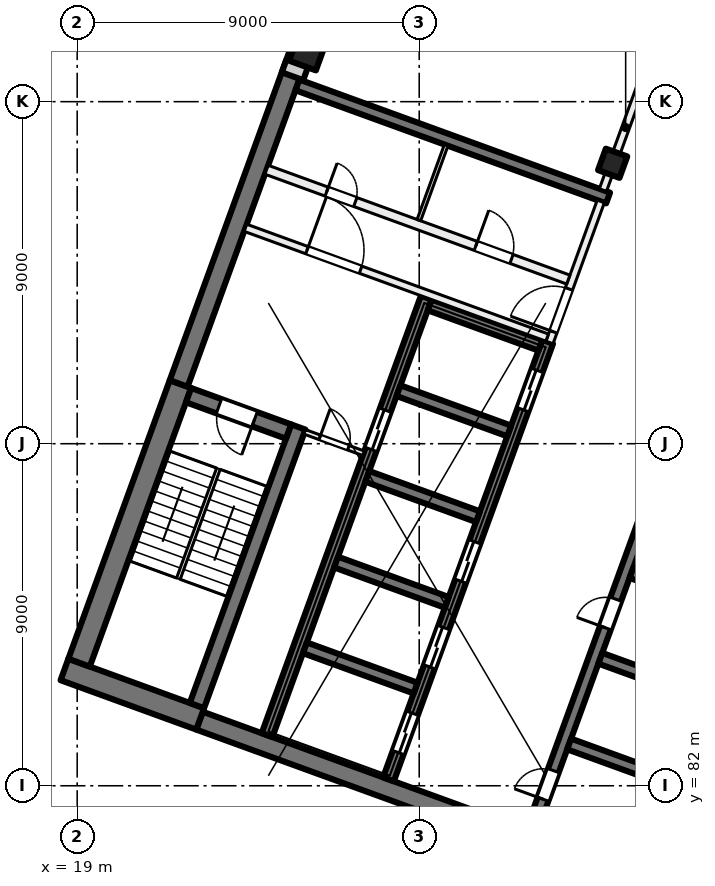
"""IFC4 building model, lengths in metres.
Left out: names, types, materials, properties, quantities, classifications, styles, units other than length and angle.
Written with IfcOpenShell. Run it as: python <this file> out.ifc"""

import sys

from ifc_helpers import new_model, si_unit, direction, frame, frame_2d, origin, origin_2d, place, context, subcontext, project, spatial, rectangle, extrude, element, fill, save


model = new_model("IFC4")
c1 = context("Model", 3, precision=1e-05, world=origin(), true_north=direction((0.0, 1.0)))
c2 = subcontext(c1, "Body", "Model", "MODEL_VIEW")
j1 = project(units=[si_unit("LENGTHUNIT", "METRE"), si_unit("PLANEANGLEUNIT", "RADIAN")], contexts=[c1])
p1 = place(None, origin())
s1 = spatial("IfcSite", under=j1, at=p1, CompositionType="ELEMENT")
p2 = place(p1, origin())
s2 = spatial("IfcBuilding", under=s1, at=p2, CompositionType="ELEMENT")
p3 = place(p2, frame((0.0, 0.0, 188.0)))
s3 = spatial("IfcBuildingStorey", under=s2, at=p3, CompositionType="ELEMENT", Elevation=188.0)
p4 = place(p3, frame((33.091, 98.379, 0.0), z_axis=(0.0, 0.0, 1.0), x_axis=(-0.342020143326, -0.939692620786, 0.0)))
e1 = element("IfcColumn", 1, at=p4, inside=s3, PredefinedType="COLUMN", context=c2, shape_type="SweptSolid", body=[
    extrude(rectangle(XDim=0.6, YDim=0.6, at=origin_2d()), origin(), (0.0, 0.0, 1.0), 4.0),
])
p5 = place(p3, frame((25.056, 101.303, 0.0), z_axis=(0.0, 0.0, 1.0), x_axis=(-0.342020143326, -0.939692620786, 0.0)))
e2 = element("IfcColumn", 2, at=p5, inside=s3, PredefinedType="COLUMN", context=c2, shape_type="SweptSolid", body=[
    extrude(rectangle(XDim=0.75, YDim=0.75, at=origin_2d()), origin(), (0.0, 0.0, 1.0), 4.0),
])
p6 = place(p3, frame((35.75, 78.788, 0.0), z_axis=(0.0, 0.0, 1.0), x_axis=(-0.939692894512, 0.342019391267, 0.0)))
e3 = element("IfcWall", 3, at=p6, inside=s3, PredefinedType="SHEAR", context=c2, shape_type="SweptSolid", body=[
    extrude(rectangle(XDim=14.4, YDim=0.5, at=frame_2d((7.2, 0.0))), origin(), (0.0, 0.0, 1.0), 4.0),
])
p7 = place(p3, frame((22.236, 83.76, 0.0), z_axis=(0.0, 0.0, 1.0), x_axis=(-0.939680822529, 0.342052557032, 0.0)))
e4 = element("IfcWall", 4, at=p7, inside=s3, PredefinedType="SHEAR", context=c2, shape_type="SweptSolid", body=[
    extrude(rectangle(XDim=3.8, YDim=0.6, at=frame_2d((1.9, 0.0))), origin(), (0.0, 0.0, 1.0), 4.0),
])
p8 = place(p3, frame((19.05, 85.239, 0.0), z_axis=(0.0, 0.0, 1.0), x_axis=(0.342016982193, 0.939693771338, 0.0)))
e5 = element("IfcWall", 5, at=p8, inside=s3, PredefinedType="SHEAR", context=c2, shape_type="SweptSolid", body=[
    extrude(rectangle(XDim=7.8, YDim=0.6, at=frame_2d((3.9, 0.0))), origin(), (0.0, 0.0, 1.0), 4.0),
])
p9 = place(p3, frame((21.67, 92.585, 0.0), z_axis=(0.0, 0.0, 1.0), x_axis=(0.342035714298, 0.93968695327, 0.0)))
e6 = element("IfcWall", 6, at=p9, inside=s3, PredefinedType="SHEAR", context=c2, shape_type="SweptSolid", body=[
    extrude(rectangle(XDim=8.975, YDim=0.5, at=frame_2d((4.488, 0.0))), origin(), (0.0, 0.0, 1.0), 4.0),
])
p10 = place(p3, frame((22.15, 84.11, 0.0), z_axis=(0.0, 0.0, 1.0), x_axis=(0.342016982193, 0.939693771338, 0.0)))
e7 = element("IfcWall", 7, at=p10, inside=s3, PredefinedType="SHEAR", context=c2, shape_type="SweptSolid", body=[
    extrude(rectangle(XDim=7.8, YDim=0.4, at=frame_2d((3.9, 0.0))), origin(), (0.0, 0.0, 1.0), 4.0),
])
p11 = place(p3, frame((24.562, 91.32, 0.0), z_axis=(0.0, 0.0, 1.0), x_axis=(-0.939717030584, 0.341953070509, 0.0)))
e8 = element("IfcWall", 8, at=p11, inside=s3, PredefinedType="SHEAR", context=c2, shape_type="SweptSolid", body=[
    extrude(rectangle(XDim=2.8, YDim=0.4, at=frame_2d((1.4, 0.0))), origin(), (0.0, 0.0, 1.0), 4.0),
])
p12 = place(p11, frame((0.95, 0.0, 0.0)))
e9 = element("IfcOpeningElement", 9, at=p12, cuts=e8, PredefinedType="OPENING", context=c2, shape_type="SweptSolid", body=[
    extrude(rectangle(XDim=1.0, YDim=2.1, at=frame_2d((0.5, 1.05))), frame((0.0, 0.21, 0.0), z_axis=(0.0, -1.0, 0.0), x_axis=(1.0, 0.0, 0.0)), (0.0, 0.0, 1.0), 0.42),
])
p13 = place(p3, frame((30.949, 80.801, 0.0), z_axis=(0.0, 0.0, 1.0), x_axis=(0.342016684409, 0.939693879721, 0.0)))
e10 = element("IfcWall", 10, at=p13, inside=s3, PredefinedType="SHEAR", context=c2, shape_type="SweptSolid", body=[
    extrude(rectangle(XDim=12.25, YDim=0.3, at=frame_2d((6.125, 0.0))), origin(), (0.0, 0.0, 1.0), 4.0),
])
p14 = place(p13, frame((0.9, 0.0, 0.0)))
e11 = element("IfcOpeningElement", 11, at=p14, cuts=e10, PredefinedType="OPENING", context=c2, shape_type="SweptSolid", body=[
    extrude(rectangle(XDim=0.8, YDim=2.1, at=frame_2d((0.4, 1.05))), frame((0.0, 0.16, 0.0), z_axis=(0.0, -1.0, 0.0), x_axis=(1.0, 0.0, 0.0)), (0.0, 0.0, 1.0), 0.32),
])
p15 = place(p13, frame((5.7, 0.0, 0.0)))
e12 = element("IfcOpeningElement", 12, at=p15, cuts=e10, PredefinedType="OPENING", context=c2, shape_type="SweptSolid", body=[
    extrude(rectangle(XDim=0.8, YDim=2.1, at=frame_2d((0.4, 1.05))), frame((0.0, 0.16, 0.0), z_axis=(0.0, -1.0, 0.0), x_axis=(1.0, 0.0, 0.0)), (0.0, 0.0, 1.0), 0.32),
])
p16 = place(p3, frame((34.858, 82.039, 0.0), z_axis=(0.0, 0.0, 1.0), x_axis=(-0.939689908313, 0.342027595692, 0.0)))
e13 = element("IfcWall", 13, at=p16, inside=s3, PredefinedType="SHEAR", context=c2, shape_type="SweptSolid", body=[
    extrude(rectangle(XDim=3.1, YDim=0.3, at=frame_2d((1.55, 0.0))), origin(), (0.0, 0.0, 1.0), 4.0),
])
p17 = place(p3, frame((35.679, 84.294, 0.0), z_axis=(0.0, 0.0, 1.0), x_axis=(-0.939706007505, 0.341983361377, 0.0)))
e14 = element("IfcWall", 14, at=p17, inside=s3, PredefinedType="SHEAR", context=c2, shape_type="SweptSolid", body=[
    extrude(rectangle(XDim=3.1, YDim=0.3, at=frame_2d((1.55, 0.0))), origin(), (0.0, 0.0, 1.0), 4.0),
])
p18 = place(p3, frame((36.5, 86.549, 0.0), z_axis=(0.0, 0.0, 1.0), x_axis=(-0.939689908313, 0.342027595692, 0.0)))
e15 = element("IfcWall", 15, at=p18, inside=s3, PredefinedType="SHEAR", context=c2, shape_type="SweptSolid", body=[
    extrude(rectangle(XDim=3.1, YDim=0.3, at=frame_2d((1.55, 0.0))), origin(), (0.0, 0.0, 1.0), 4.0),
])
p19 = place(p3, frame((27.191, 82.169, 0.0), z_axis=(0.0, 0.0, 1.0), x_axis=(0.342016684409, 0.939693879721, 0.0)))
e16 = element("IfcWall", 16, at=p19, inside=s3, PredefinedType="SHEAR", context=c2, shape_type="SweptSolid", body=[
    extrude(rectangle(XDim=12.25, YDim=0.3, at=frame_2d((6.125, 0.0))), origin(), (0.0, 0.0, 1.0), 4.0),
])
p20 = place(p19, frame((0.75, 0.0, 0.0)))
e17 = element("IfcOpeningElement", 17, at=p20, cuts=e16, PredefinedType="OPENING", context=c2, shape_type="SweptSolid", body=[
    extrude(rectangle(XDim=1.1, YDim=2.1, at=frame_2d((0.55, 1.05))), frame((0.0, 0.16, 0.0), z_axis=(0.0, -1.0, 0.0), x_axis=(1.0, 0.0, 0.0)), (0.0, 0.0, 1.0), 0.32),
])
p21 = place(p19, frame((3.15, 0.0, 0.0)))
e18 = element("IfcOpeningElement", 18, at=p21, cuts=e16, PredefinedType="OPENING", context=c2, shape_type="SweptSolid", body=[
    extrude(rectangle(XDim=1.1, YDim=2.1, at=frame_2d((0.55, 1.05))), frame((0.0, 0.16, 0.0), z_axis=(0.0, -1.0, 0.0), x_axis=(1.0, 0.0, 0.0)), (0.0, 0.0, 1.0), 0.32),
])
p22 = place(p19, frame((5.55, 0.0, 0.0)))
e19 = element("IfcOpeningElement", 19, at=p22, cuts=e16, PredefinedType="OPENING", context=c2, shape_type="SweptSolid", body=[
    extrude(rectangle(XDim=1.1, YDim=2.1, at=frame_2d((0.55, 1.05))), frame((0.0, 0.16, 0.0), z_axis=(0.0, -1.0, 0.0), x_axis=(1.0, 0.0, 0.0)), (0.0, 0.0, 1.0), 0.32),
])
p23 = place(p19, frame((10.35, 0.0, 0.0)))
e20 = element("IfcOpeningElement", 20, at=p23, cuts=e16, PredefinedType="OPENING", context=c2, shape_type="SweptSolid", body=[
    extrude(rectangle(XDim=1.1, YDim=2.1, at=frame_2d((0.55, 1.05))), frame((0.0, 0.16, 0.0), z_axis=(0.0, -1.0, 0.0), x_axis=(1.0, 0.0, 0.0)), (0.0, 0.0, 1.0), 0.32),
])
p24 = place(p3, frame((23.996, 83.332, 0.0), z_axis=(0.0, 0.0, 1.0), x_axis=(0.342016684409, 0.939693879721, 0.0)))
e21 = element("IfcWall", 21, at=p24, inside=s3, PredefinedType="SHEAR", context=c2, shape_type="SweptSolid", body=[
    extrude(rectangle(XDim=12.25, YDim=0.3, at=frame_2d((6.125, 0.0))), origin(), (0.0, 0.0, 1.0), 4.0),
])
p25 = place(p24, frame((8.0, 0.0, 0.0)))
e22 = element("IfcOpeningElement", 22, at=p25, cuts=e21, PredefinedType="OPENING", context=c2, shape_type="SweptSolid", body=[
    extrude(rectangle(XDim=1.1, YDim=2.1, at=frame_2d((0.55, 1.05))), frame((0.0, 0.16, 0.0), z_axis=(0.0, -1.0, 0.0), x_axis=(1.0, 0.0, 0.0)), (0.0, 0.0, 1.0), 0.32),
])
for number, where, z_axis, x_axis in (
    (23, (27.905, 84.57, 0.0), (0.0, 0.0, 1.0), (-0.94, 0.342, 0.0)),
    (24, (28.726, 86.825, 0.0), (0.0, 0.0, 1.0), (-0.94, 0.342, 0.0)),
    (25, (29.546, 89.08, 0.0), (0.0, 0.0, 1.0), (-0.94, 0.342, 0.0)),
):
    element("IfcWall", number, at=place(p3, frame(where, z_axis=z_axis, x_axis=x_axis)), inside=s3, PredefinedType="SHEAR", context=c2, shape_type="SweptSolid", body=[
        extrude(rectangle(XDim=3.1, YDim=0.3, at=frame_2d((1.55, 0.0))), origin(), (0.0, 0.0, 1.0), 4.0),
    ])
for number, where, z_axis, x_axis in (
    (26, (30.367, 91.336, 0.0), (0.0, 0.0, 1.0), (-0.94, 0.342, 0.0)),
    (27, (31.188, 93.591, 0.0), (0.0, 0.0, 1.0), (-0.94, 0.342, 0.0)),
):
    element("IfcWall", number, at=place(p3, frame(where, z_axis=z_axis, x_axis=x_axis)), inside=s3, PredefinedType="SHEAR", context=c2, shape_type="SweptSolid", body=[
        extrude(rectangle(XDim=3.1, YDim=0.3, at=frame_2d((1.55, 0.0))), origin(), (0.0, 0.0, 1.0), 4.0),
    ])
p26 = place(p3, frame((32.971, 97.465, 0.0), z_axis=(0.0, 0.0, 1.0), x_axis=(-0.939695066972, 0.34201342241, 0.0)))
e28 = element("IfcWall", 28, at=p26, inside=s3, PredefinedType="SHEAR", context=c2, shape_type="SweptSolid", body=[
    extrude(rectangle(XDim=8.7, YDim=0.3, at=frame_2d((4.35, 0.0))), origin(), (0.0, 0.0, 1.0), 4.0),
])
p27 = place(p3, frame((24.666, 100.669, 0.0), z_axis=(0.0, 0.0, 1.0), x_axis=(0.34201964167, 0.939692803373, 0.0)))
e29 = element("IfcWall", 29, at=p27, inside=s3, PredefinedType="SOLIDWALL", context=c2, shape_type="SweptSolid", body=[
    extrude(rectangle(XDim=32.884, YDim=0.6, at=frame_2d((16.442, 0.0))), origin(), (0.0, 0.0, 1.0), 3.625),
])
p28 = place(p27, frame((1.48, 0.0, 0.9)))
e30 = element("IfcOpeningElement", 30, at=p28, cuts=e29, PredefinedType="OPENING", context=c2, shape_type="SweptSolid", body=[
    extrude(rectangle(XDim=3.0, YDim=2.4, at=frame_2d((1.5, 1.2))), frame((0.0, 0.31, 0.0), z_axis=(0.0, -1.0, 0.0), x_axis=(1.0, 0.0, 0.0)), (0.0, 0.0, 1.0), 0.62),
])
p29 = place(p27, frame((5.98, 0.0, 0.9)))
e31 = element("IfcOpeningElement", 31, at=p29, cuts=e29, PredefinedType="OPENING", context=c2, shape_type="SweptSolid", body=[
    extrude(rectangle(XDim=3.0, YDim=2.4, at=frame_2d((1.5, 1.2))), frame((0.0, 0.31, 0.0), z_axis=(0.0, -1.0, 0.0), x_axis=(1.0, 0.0, 0.0)), (0.0, 0.0, 1.0), 0.62),
])
p30 = place(p27, frame((10.48, 0.0, 0.9)))
e32 = element("IfcOpeningElement", 32, at=p30, cuts=e29, PredefinedType="OPENING", context=c2, shape_type="SweptSolid", body=[
    extrude(rectangle(XDim=3.0, YDim=2.4, at=frame_2d((1.5, 1.2))), frame((0.0, 0.31, 0.0), z_axis=(0.0, -1.0, 0.0), x_axis=(1.0, 0.0, 0.0)), (0.0, 0.0, 1.0), 0.62),
])
p31 = place(p27, frame((14.98, 0.0, 0.9)))
e33 = element("IfcOpeningElement", 33, at=p31, cuts=e29, PredefinedType="OPENING", context=c2, shape_type="SweptSolid", body=[
    extrude(rectangle(XDim=3.0, YDim=2.4, at=frame_2d((1.5, 1.2))), frame((0.0, 0.31, 0.0), z_axis=(0.0, -1.0, 0.0), x_axis=(1.0, 0.0, 0.0)), (0.0, 0.0, 1.0), 0.62),
])
p32 = place(p27, frame((19.48, 0.0, 0.9)))
e34 = element("IfcOpeningElement", 34, at=p32, cuts=e29, PredefinedType="OPENING", context=c2, shape_type="SweptSolid", body=[
    extrude(rectangle(XDim=3.0, YDim=2.4, at=frame_2d((1.5, 1.2))), frame((0.0, 0.31, 0.0), z_axis=(0.0, -1.0, 0.0), x_axis=(1.0, 0.0, 0.0)), (0.0, 0.0, 1.0), 0.62),
])
p33 = place(p27, frame((23.98, 0.0, 0.9)))
e35 = element("IfcOpeningElement", 35, at=p33, cuts=e29, PredefinedType="OPENING", context=c2, shape_type="SweptSolid", body=[
    extrude(rectangle(XDim=3.0, YDim=2.4, at=frame_2d((1.5, 1.2))), frame((0.0, 0.31, 0.0), z_axis=(0.0, -1.0, 0.0), x_axis=(1.0, 0.0, 0.0)), (0.0, 0.0, 1.0), 0.62),
])
p34 = place(p27, frame((28.48, 0.0, 0.9)))
e36 = element("IfcOpeningElement", 36, at=p34, cuts=e29, PredefinedType="OPENING", context=c2, shape_type="SweptSolid", body=[
    extrude(rectangle(XDim=3.0, YDim=2.4, at=frame_2d((1.5, 1.2))), frame((0.0, 0.31, 0.0), z_axis=(0.0, -1.0, 0.0), x_axis=(1.0, 0.0, 0.0)), (0.0, 0.0, 1.0), 0.62),
])
p35 = place(p3, frame((31.427, 93.663, 0.0), z_axis=(0.0, 0.0, 1.0), x_axis=(0.342030870568, 0.93968871632, 0.0)))
e37 = element("IfcWall", 37, at=p35, inside=s3, PredefinedType="PARTITIONING", context=c2, shape_type="SweptSolid", body=[
    extrude(rectangle(XDim=3.95, YDim=0.2, at=frame_2d((1.975, 0.0))), origin(), (0.0, 0.0, 1.0), 3.625),
])
p36 = place(p35, frame((0.3, 0.0, 0.0)))
e38 = element("IfcOpeningElement", 38, at=p36, cuts=e37, PredefinedType="OPENING", context=c2, shape_type="SweptSolid", body=[
    extrude(rectangle(XDim=1.2, YDim=2.1, at=frame_2d((0.6, 1.05))), frame((0.0, 0.11, 0.0), z_axis=(0.0, -1.0, 0.0), x_axis=(1.0, 0.0, 0.0)), (0.0, 0.0, 1.0), 0.22),
])
p37 = place(p3, frame((23.427, 96.682, 0.0), z_axis=(0.0, 0.0, 1.0), x_axis=(0.939690465531, -0.342026064782, 0.0)))
e39 = element("IfcWall", 39, at=p37, inside=s3, PredefinedType="PARTITIONING", context=c2, shape_type="SweptSolid", body=[
    extrude(rectangle(XDim=8.45, YDim=0.2, at=frame_2d((4.225, 0.0))), origin(), (0.0, 0.0, 1.0), 3.625),
])
p38 = place(p37, frame((1.725, 0.0, 0.0)))
e40 = element("IfcOpeningElement", 40, at=p38, cuts=e39, PredefinedType="OPENING", context=c2, shape_type="SweptSolid", body=[
    extrude(rectangle(XDim=1.5, YDim=2.1, at=frame_2d((0.75, 1.05))), frame((0.0, 0.11, 0.0), z_axis=(0.0, -1.0, 0.0), x_axis=(1.0, 0.0, 0.0)), (0.0, 0.0, 1.0), 0.22),
])
p39 = place(p3, frame((23.983, 98.208, 0.0), z_axis=(0.0, 0.0, 1.0), x_axis=(0.939699751196, -0.342000552051, 0.0)))
e41 = element("IfcWall", 41, at=p39, inside=s3, PredefinedType="PARTITIONING", context=c2, shape_type="SweptSolid", body=[
    extrude(rectangle(XDim=8.45, YDim=0.25, at=frame_2d((4.225, 0.0))), origin(), (0.0, 0.0, 1.0), 3.625),
])
p40 = place(p39, frame((5.86, 0.0, 0.0)))
e42 = element("IfcOpeningElement", 42, at=p40, cuts=e41, PredefinedType="OPENING", context=c2, shape_type="SweptSolid", body=[
    extrude(rectangle(XDim=1.0, YDim=2.1, at=frame_2d((0.5, 1.05))), frame((0.0, 0.135, 0.0), z_axis=(0.0, -1.0, 0.0), x_axis=(1.0, 0.0, 0.0)), (0.0, 0.0, 1.0), 0.27),
])
p41 = place(p39, frame((1.685, 0.0, 0.0)))
e43 = element("IfcOpeningElement", 43, at=p41, cuts=e41, PredefinedType="OPENING", context=c2, shape_type="SweptSolid", body=[
    extrude(rectangle(XDim=0.8, YDim=2.1, at=frame_2d((0.4, 1.05))), frame((0.0, 0.135, 0.0), z_axis=(0.0, -1.0, 0.0), x_axis=(1.0, 0.0, 0.0)), (0.0, 0.0, 1.0), 0.27),
])
p42 = place(p3, frame((24.985, 91.312, 0.0), z_axis=(0.0, 0.0, 1.0), x_axis=(0.939719959755, -0.341945020783, 0.0)))
e44 = element("IfcWall", 44, at=p42, inside=s3, PredefinedType="PARTITIONING", context=c2, shape_type="SweptSolid", body=[
    extrude(rectangle(XDim=1.65, YDim=0.125, at=frame_2d((0.825, 0.0))), origin(), (0.0, 0.0, 1.0), 3.625),
])
p43 = place(p42, frame((0.425, 0.0, 0.0)))
e45 = element("IfcOpeningElement", 45, at=p43, cuts=e44, PredefinedType="OPENING", context=c2, shape_type="SweptSolid", body=[
    extrude(rectangle(XDim=0.8, YDim=2.1, at=frame_2d((0.4, 1.05))), frame((0.0, 0.073, 0.0), z_axis=(0.0, -1.0, 0.0), x_axis=(1.0, 0.0, 0.0)), (0.0, 0.0, 1.0), 0.145),
])
p44 = place(p3, frame((27.991, 96.883, 0.0), z_axis=(0.0, 0.0, 1.0), x_axis=(0.342023078919, 0.939691552312, 0.0)))
e46 = element("IfcWall", 46, at=p44, inside=s3, PredefinedType="PARTITIONING", context=c2, shape_type="SweptSolid", body=[
    extrude(rectangle(XDim=2.1, YDim=0.1, at=frame_2d((1.05, 0.0))), origin(), (0.0, 0.0, 1.0), 3.625),
])
p45 = place(p3, frame((32.834, 97.674, 0.0), z_axis=(0.0, 0.0, 1.0), x_axis=(0.342017493073, 0.939693585395, 0.0)))
e47 = element("IfcWall", 47, at=p45, inside=s3, PredefinedType="PARTITIONING", context=c2, shape_type="SweptSolid", body=[
    extrude(rectangle(XDim=3.5, YDim=0.2, at=frame_2d((1.75, 0.0))), origin(), (0.0, 0.0, 1.0), 3.625),
])
p46 = place(p20, origin())
e48 = element("IfcDoor", 48, at=p46, inside=s3, OperationType="DOUBLE_DOOR_SLIDING", PredefinedType="DOOR", context=c2, shape_type="SweptSolid", body=[
    extrude(rectangle(XDim=1.1, YDim=2.1, at=frame_2d((0.55, 1.05))), frame((0.0, 0.025, 0.0), z_axis=(0.0, -1.0, 0.0), x_axis=(1.0, 0.0, 0.0)), (0.0, 0.0, 1.0), 0.05),
])
fill(e17, e48)
p47 = place(p21, origin())
e49 = element("IfcDoor", 49, at=p47, inside=s3, OperationType="DOUBLE_DOOR_SLIDING", PredefinedType="DOOR", context=c2, shape_type="SweptSolid", body=[
    extrude(rectangle(XDim=1.1, YDim=2.1, at=frame_2d((0.55, 1.05))), frame((0.0, 0.025, 0.0), z_axis=(0.0, -1.0, 0.0), x_axis=(1.0, 0.0, 0.0)), (0.0, 0.0, 1.0), 0.05),
])
fill(e18, e49)
p48 = place(p22, origin())
e50 = element("IfcDoor", 50, at=p48, inside=s3, OperationType="DOUBLE_DOOR_SLIDING", PredefinedType="DOOR", context=c2, shape_type="SweptSolid", body=[
    extrude(rectangle(XDim=1.1, YDim=2.1, at=frame_2d((0.55, 1.05))), frame((0.0, 0.025, 0.0), z_axis=(0.0, -1.0, 0.0), x_axis=(1.0, 0.0, 0.0)), (0.0, 0.0, 1.0), 0.05),
])
fill(e19, e50)
p49 = place(p23, origin())
e51 = element("IfcDoor", 51, at=p49, inside=s3, OperationType="DOUBLE_DOOR_SLIDING", PredefinedType="DOOR", context=c2, shape_type="SweptSolid", body=[
    extrude(rectangle(XDim=1.1, YDim=2.1, at=frame_2d((0.55, 1.05))), frame((0.0, 0.025, 0.0), z_axis=(0.0, -1.0, 0.0), x_axis=(1.0, 0.0, 0.0)), (0.0, 0.0, 1.0), 0.05),
])
fill(e20, e51)
p50 = place(p14, origin())
e52 = element("IfcDoor", 52, at=p50, inside=s3, OperationType="SINGLE_SWING_LEFT", PredefinedType="DOOR", context=c2, shape_type="SweptSolid", body=[
    extrude(rectangle(XDim=0.8, YDim=2.1, at=frame_2d((0.4, 1.05))), frame((0.0, 0.025, 0.0), z_axis=(0.0, -1.0, 0.0), x_axis=(1.0, 0.0, 0.0)), (0.0, 0.0, 1.0), 0.05),
])
fill(e11, e52)
p51 = place(p15, origin())
e53 = element("IfcDoor", 53, at=p51, inside=s3, OperationType="SINGLE_SWING_RIGHT", PredefinedType="DOOR", context=c2, shape_type="SweptSolid", body=[
    extrude(rectangle(XDim=0.8, YDim=2.1, at=frame_2d((0.4, 1.05))), frame((0.0, 0.025, 0.0), z_axis=(0.0, -1.0, 0.0), x_axis=(1.0, 0.0, 0.0)), (0.0, 0.0, 1.0), 0.05),
])
fill(e12, e53)
p52 = place(p36, origin())
e54 = element("IfcDoor", 54, at=p52, inside=s3, OperationType="DOUBLE_DOOR_SINGLE_SWING", PredefinedType="DOOR", context=c2, shape_type="SweptSolid", body=[
    extrude(rectangle(XDim=1.2, YDim=2.1, at=frame_2d((0.6, 1.05))), frame((0.0, 0.025, 0.0), z_axis=(0.0, -1.0, 0.0), x_axis=(1.0, 0.0, 0.0)), (0.0, 0.0, 1.0), 0.05),
])
fill(e38, e54)
p53 = place(p38, origin())
e55 = element("IfcDoor", 55, at=p53, inside=s3, OperationType="DOUBLE_DOOR_SINGLE_SWING", PredefinedType="DOOR", context=c2, shape_type="SweptSolid", body=[
    extrude(rectangle(XDim=1.5, YDim=2.1, at=frame_2d((0.75, 1.05))), frame((0.0, 0.025, 0.0), z_axis=(0.0, -1.0, 0.0), x_axis=(1.0, 0.0, 0.0)), (0.0, 0.0, 1.0), 0.05),
])
fill(e40, e55)
p54 = place(p12, origin())
e56 = element("IfcDoor", 56, at=p54, inside=s3, OperationType="SINGLE_SWING_LEFT", PredefinedType="DOOR", context=c2, shape_type="SweptSolid", body=[
    extrude(rectangle(XDim=1.0, YDim=2.1, at=frame_2d((0.5, 1.05))), frame((0.0, 0.025, 0.0), z_axis=(0.0, -1.0, 0.0), x_axis=(1.0, 0.0, 0.0)), (0.0, 0.0, 1.0), 0.05),
])
fill(e9, e56)
p55 = place(p43, origin())
e57 = element("IfcDoor", 57, at=p55, inside=s3, OperationType="SINGLE_SWING_RIGHT", PredefinedType="DOOR", context=c2, shape_type="SweptSolid", body=[
    extrude(rectangle(XDim=0.8, YDim=2.1, at=frame_2d((0.4, 1.05))), frame((0.0, 0.025, 0.0), z_axis=(0.0, -1.0, 0.0), x_axis=(1.0, 0.0, 0.0)), (0.0, 0.0, 1.0), 0.05),
])
fill(e45, e57)
p56 = place(p40, origin())
e58 = element("IfcDoor", 58, at=p56, inside=s3, OperationType="SINGLE_SWING_LEFT", PredefinedType="DOOR", context=c2, shape_type="SweptSolid", body=[
    extrude(rectangle(XDim=1.0, YDim=2.1, at=frame_2d((0.5, 1.05))), frame((0.0, 0.025, 0.0), z_axis=(0.0, -1.0, 0.0), x_axis=(1.0, 0.0, 0.0)), (0.0, 0.0, 1.0), 0.05),
])
fill(e42, e58)
p57 = place(p41, origin())
e59 = element("IfcDoor", 59, at=p57, inside=s3, OperationType="SINGLE_SWING_RIGHT", PredefinedType="DOOR", context=c2, shape_type="SweptSolid", body=[
    extrude(rectangle(XDim=0.8, YDim=2.1, at=frame_2d((0.4, 1.05))), frame((0.0, 0.025, 0.0), z_axis=(0.0, -1.0, 0.0), x_axis=(1.0, 0.0, 0.0)), (0.0, 0.0, 1.0), 0.05),
])
fill(e43, e59)
p58 = place(p25, origin())
e60 = element("IfcDoor", 60, at=p58, inside=s3, OperationType="DOUBLE_DOOR_SLIDING", PredefinedType="DOOR", context=c2, shape_type="SweptSolid", body=[
    extrude(rectangle(XDim=1.1, YDim=2.1, at=frame_2d((0.55, 1.05))), frame((0.0, 0.025, 0.0), z_axis=(0.0, -1.0, 0.0), x_axis=(1.0, 0.0, 0.0)), (0.0, 0.0, 1.0), 0.05),
])
fill(e22, e60)
save(model, sys.argv[1])
